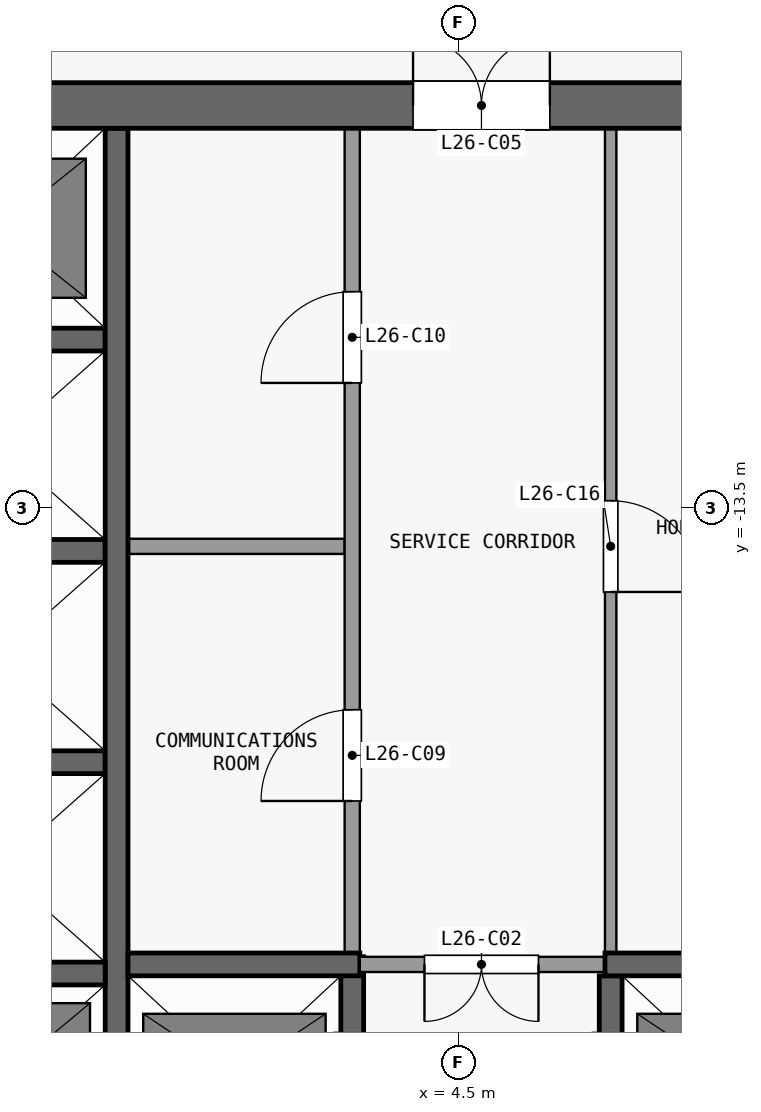
"""IFC4 building model, lengths in metres.
Left out: names, types, materials, properties, quantities, classifications, styles, units other than length and angle.
Written with IfcOpenShell. Run it as: python <this file> out.ifc"""

import sys

from ifc_helpers import new_model, si_unit, direction, frame, frame_2d, origin, place, context, subcontext, project, spatial, rectangle, extrude, element, fill, save


model = new_model("IFC4")
c1 = context("Model", 3, precision=1e-05, world=origin(), true_north=direction((0.0, 1.0)))
c2 = subcontext(c1, "Body", "Model", "MODEL_VIEW")
j1 = project(units=[si_unit("LENGTHUNIT", "METRE"), si_unit("PLANEANGLEUNIT", "RADIAN")], contexts=[c1])
p1 = place(None, origin())
s1 = spatial("IfcSite", under=j1, at=p1, CompositionType="ELEMENT")
p2 = place(p1, origin())
s2 = spatial("IfcBuilding", under=s1, at=p2, CompositionType="ELEMENT")
p3 = place(p2, frame((0.0, 0.0, 106.3)))
s3 = spatial("IfcBuildingStorey", under=s2, at=p3, CompositionType="ELEMENT", Elevation=106.3)
p4 = place(p3, frame((-13.4, -8.2, 0.0), z_axis=(0.0, 0.0, 1.0), x_axis=(1.0, 0.0, 0.0)))
e1 = element("IfcWall", 1, at=p4, inside=s3, PredefinedType="SHEAR", context=c2, shape_type="SweptSolid", body=[
    extrude(rectangle(XDim=26.8, YDim=0.6, at=frame_2d((13.4, 0.0))), origin(), (0.0, 0.0, 1.0), 3.3),
])
p5 = place(p4, frame((7.7, 0.0, 0.0)))
e2 = element("IfcOpeningElement", 2, at=p5, cuts=e1, PredefinedType="OPENING", context=c2, shape_type="SweptSolid", body=[
    extrude(rectangle(XDim=1.8, YDim=2.1, at=frame_2d((0.9, 1.05))), frame((0.0, 0.31, 0.0), z_axis=(0.0, -1.0, 0.0), x_axis=(1.0, 0.0, 0.0)), (0.0, 0.0, 1.0), 0.62),
])
p6 = place(p4, frame((17.3, 0.0, 0.0)))
e3 = element("IfcOpeningElement", 3, at=p6, cuts=e1, PredefinedType="OPENING", context=c2, shape_type="SweptSolid", body=[
    extrude(rectangle(XDim=1.8, YDim=2.1, at=frame_2d((0.9, 1.05))), frame((0.0, 0.31, 0.0), z_axis=(0.0, -1.0, 0.0), x_axis=(1.0, 0.0, 0.0)), (0.0, 0.0, 1.0), 0.62),
])
p7 = place(p4, frame((2.625, 0.0, 0.0)))
e4 = element("IfcOpeningElement", 4, at=p7, cuts=e1, PredefinedType="OPENING", context=c2, shape_type="SweptSolid", body=[
    extrude(rectangle(XDim=0.9, YDim=2.1, at=frame_2d((0.45, 1.05))), frame((0.0, 0.31, 0.0), z_axis=(0.0, -1.0, 0.0), x_axis=(1.0, 0.0, 0.0)), (0.0, 0.0, 1.0), 0.62),
])
p8 = place(p4, frame((23.275, 0.0, 0.0)))
e5 = element("IfcOpeningElement", 5, at=p8, cuts=e1, PredefinedType="OPENING", context=c2, shape_type="SweptSolid", body=[
    extrude(rectangle(XDim=0.9, YDim=2.1, at=frame_2d((0.45, 1.05))), frame((0.0, 0.31, 0.0), z_axis=(0.0, -1.0, 0.0), x_axis=(1.0, 0.0, 0.0)), (0.0, 0.0, 1.0), 0.62),
])
p9 = place(p3, frame((-2.95, -19.62, 0.0), z_axis=(0.0, 0.0, 1.0), x_axis=(1.0, 0.0, 0.0)))
e6 = element("IfcWall", 6, at=p9, inside=s3, PredefinedType="SHEAR", context=c2, shape_type="SweptSolid", body=[
    extrude(rectangle(XDim=2.8, YDim=0.3, at=frame_2d((1.4, 0.0))), origin(), (0.0, 0.0, 1.0), 3.3),
])
p10 = place(p3, frame((0.15, -19.5, 0.0), z_axis=(0.0, 0.0, 1.0), x_axis=(1.0, 0.0, 0.0)))
e7 = element("IfcWall", 7, at=p10, inside=s3, PredefinedType="SHEAR", context=c2, shape_type="SweptSolid", body=[
    extrude(rectangle(XDim=3.05, YDim=0.3, at=frame_2d((1.525, 0.0))), origin(), (0.0, 0.0, 1.0), 3.3),
])
p11 = place(p3, frame((6.575, -19.5, 0.0), z_axis=(0.0, 0.0, 1.0), x_axis=(-1.0, 0.0, 0.0)))
e8 = element("IfcWall", 8, at=p11, inside=s3, PredefinedType="PARTITIONING", context=c2, shape_type="SweptSolid", body=[
    extrude(rectangle(XDim=3.375, YDim=0.2, at=frame_2d((1.688, 0.0))), origin(), (0.0, 0.0, 1.0), 3.3),
])
p12 = place(p11, frame((1.025, 0.0, 0.0)))
e9 = element("IfcOpeningElement", 9, at=p12, cuts=e8, PredefinedType="OPENING", context=c2, shape_type="SweptSolid", body=[
    extrude(rectangle(XDim=1.5, YDim=2.1, at=frame_2d((0.75, 1.05))), frame((0.0, 0.11, 0.0), z_axis=(0.0, -1.0, 0.0), x_axis=(1.0, 0.0, 0.0)), (0.0, 0.0, 1.0), 0.22),
])
p13 = place(p3, frame((6.425, -19.5, 0.0), z_axis=(0.0, 0.0, 1.0), x_axis=(1.0, 0.0, 0.0)))
e10 = element("IfcWall", 10, at=p13, inside=s3, PredefinedType="SHEAR", context=c2, shape_type="SweptSolid", body=[
    extrude(rectangle(XDim=3.025, YDim=0.3, at=frame_2d((1.512, 0.0))), origin(), (0.0, 0.0, 1.0), 3.3),
])
for number, where, z_axis, x_axis in (
    (11, (-2.95, -16.84, 0.0), (0.0, 0.0, 1.0), (1.0, 0.0, 0.0)),
    (12, (-2.95, -14.06, 0.0), (0.0, 0.0, 1.0), (1.0, 0.0, 0.0)),
):
    element("IfcWall", number, at=place(p3, frame(where, z_axis=z_axis, x_axis=x_axis)), inside=s3, PredefinedType="SHEAR", context=c2, shape_type="SweptSolid", body=[
        extrude(rectangle(XDim=2.8, YDim=0.3, at=frame_2d((1.4, 0.0))), origin(), (0.0, 0.0, 1.0), 3.3),
    ])
p14 = place(p3, frame((0.15, -14.0, 0.0), z_axis=(0.0, 0.0, 1.0), x_axis=(1.0, 0.0, 0.0)))
e13 = element("IfcWall", 13, at=p14, inside=s3, PredefinedType="PARTITIONING", context=c2, shape_type="SweptSolid", body=[
    extrude(rectangle(XDim=2.85, YDim=0.2, at=frame_2d((1.425, 0.0))), origin(), (0.0, 0.0, 1.0), 3.3),
])
p15 = place(p3, frame((-2.95, -11.28, 0.0), z_axis=(0.0, 0.0, 1.0), x_axis=(1.0, 0.0, 0.0)))
e14 = element("IfcWall", 14, at=p15, inside=s3, PredefinedType="SHEAR", context=c2, shape_type="SweptSolid", body=[
    extrude(rectangle(XDim=2.8, YDim=0.3, at=frame_2d((1.4, 0.0))), origin(), (0.0, 0.0, 1.0), 3.3),
])
p16 = place(p3, frame((0.0, -22.25, 0.0), z_axis=(0.0, 0.0, 1.0), x_axis=(0.0, 1.0, 0.0)))
e15 = element("IfcWall", 15, at=p16, inside=s3, PredefinedType="SHEAR", context=c2, shape_type="SweptSolid", body=[
    extrude(rectangle(XDim=13.75, YDim=0.3, at=frame_2d((6.875, 0.0))), origin(), (0.0, 0.0, 1.0), 3.3),
])
p17 = place(p3, frame((3.1, -22.25, 0.0), z_axis=(0.0, 0.0, 1.0), x_axis=(0.0, 1.0, 0.0)))
e16 = element("IfcWall", 16, at=p17, inside=s3, PredefinedType="SHEAR", context=c2, shape_type="SweptSolid", body=[
    extrude(rectangle(XDim=2.85, YDim=0.3, at=frame_2d((1.425, 0.0))), origin(), (0.0, 0.0, 1.0), 3.3),
])
p18 = place(p17, frame((0.75, 0.0, 0.0)))
e17 = element("IfcOpeningElement", 17, at=p18, cuts=e16, PredefinedType="OPENING", context=c2, shape_type="SweptSolid", body=[
    extrude(rectangle(XDim=1.1, YDim=2.1, at=frame_2d((0.55, 1.05))), frame((0.0, 0.16, 0.0), z_axis=(0.0, -1.0, 0.0), x_axis=(1.0, 0.0, 0.0)), (0.0, 0.0, 1.0), 0.32),
])
p19 = place(p3, frame((3.1, -19.6, 0.0), z_axis=(0.0, 0.0, 1.0), x_axis=(0.0, 1.0, 0.0)))
e18 = element("IfcWall", 18, at=p19, inside=s3, PredefinedType="PARTITIONING", context=c2, shape_type="SweptSolid", body=[
    extrude(rectangle(XDim=11.1, YDim=0.2, at=frame_2d((5.55, 0.0))), origin(), (0.0, 0.0, 1.0), 3.3),
])
p20 = place(p19, frame((2.25, 0.0, 0.0)))
e19 = element("IfcOpeningElement", 19, at=p20, cuts=e18, PredefinedType="OPENING", context=c2, shape_type="SweptSolid", body=[
    extrude(rectangle(XDim=1.2, YDim=2.1, at=frame_2d((0.6, 1.05))), frame((0.0, 0.11, 0.0), z_axis=(0.0, -1.0, 0.0), x_axis=(1.0, 0.0, 0.0)), (0.0, 0.0, 1.0), 0.22),
])
p21 = place(p19, frame((7.75, 0.0, 0.0)))
e20 = element("IfcOpeningElement", 20, at=p21, cuts=e18, PredefinedType="OPENING", context=c2, shape_type="SweptSolid", body=[
    extrude(rectangle(XDim=1.2, YDim=2.1, at=frame_2d((0.6, 1.05))), frame((0.0, 0.11, 0.0), z_axis=(0.0, -1.0, 0.0), x_axis=(1.0, 0.0, 0.0)), (0.0, 0.0, 1.0), 0.22),
])
p22 = place(p3, frame((6.5, -22.25, 0.0), z_axis=(0.0, 0.0, 1.0), x_axis=(0.0, 1.0, 0.0)))
e21 = element("IfcWall", 21, at=p22, inside=s3, PredefinedType="SHEAR", context=c2, shape_type="SweptSolid", body=[
    extrude(rectangle(XDim=2.6, YDim=0.3, at=frame_2d((1.3, 0.0))), origin(), (0.0, 0.0, 1.0), 3.3),
])
p23 = place(p22, frame((0.75, 0.0, 0.0)))
e22 = element("IfcOpeningElement", 22, at=p23, cuts=e21, PredefinedType="OPENING", context=c2, shape_type="SweptSolid", body=[
    extrude(rectangle(XDim=1.1, YDim=2.1, at=frame_2d((0.55, 1.05))), frame((0.0, 0.16, 0.0), z_axis=(0.0, -1.0, 0.0), x_axis=(1.0, 0.0, 0.0)), (0.0, 0.0, 1.0), 0.32),
])
p24 = place(p3, frame((6.5, -8.5, 0.0), z_axis=(0.0, 0.0, 1.0), x_axis=(0.0, -1.0, 0.0)))
e23 = element("IfcWall", 23, at=p24, inside=s3, PredefinedType="PARTITIONING", context=c2, shape_type="SweptSolid", body=[
    extrude(rectangle(XDim=10.85, YDim=0.15, at=frame_2d((5.425, 0.0))), origin(), (0.0, 0.0, 1.0), 3.3),
])
p25 = place(p24, frame((4.9, 0.0, 0.0)))
e24 = element("IfcOpeningElement", 24, at=p25, cuts=e23, PredefinedType="OPENING", context=c2, shape_type="SweptSolid", body=[
    extrude(rectangle(XDim=1.2, YDim=2.1, at=frame_2d((0.6, 1.05))), frame((0.0, 0.085, 0.0), z_axis=(0.0, -1.0, 0.0), x_axis=(1.0, 0.0, 0.0)), (0.0, 0.0, 1.0), 0.17),
])
p26 = place(p12, origin())
e25 = element("IfcDoor", 25, at=p26, inside=s3, OperationType="DOUBLE_DOOR_SINGLE_SWING", PredefinedType="DOOR", context=c2, shape_type="SweptSolid", body=[
    extrude(rectangle(XDim=1.5, YDim=2.1, at=frame_2d((0.75, 1.05))), frame((0.0, 0.025, 0.0), z_axis=(0.0, -1.0, 0.0), x_axis=(1.0, 0.0, 0.0)), (0.0, 0.0, 1.0), 0.05),
])
fill(e9, e25)
p27 = place(p6, origin())
e26 = element("IfcDoor", 26, at=p27, inside=s3, OperationType="DOUBLE_DOOR_SINGLE_SWING", PredefinedType="DOOR", context=c2, shape_type="SweptSolid", body=[
    extrude(rectangle(XDim=1.8, YDim=2.1, at=frame_2d((0.9, 1.05))), frame((0.0, 0.025, 0.0), z_axis=(0.0, -1.0, 0.0), x_axis=(1.0, 0.0, 0.0)), (0.0, 0.0, 1.0), 0.05),
])
fill(e3, e26)
p28 = place(p20, origin())
e27 = element("IfcDoor", 27, at=p28, inside=s3, OperationType="SINGLE_SWING_LEFT", PredefinedType="DOOR", context=c2, shape_type="SweptSolid", body=[
    extrude(rectangle(XDim=1.2, YDim=2.1, at=frame_2d((0.6, 1.05))), frame((0.0, 0.025, 0.0), z_axis=(0.0, -1.0, 0.0), x_axis=(1.0, 0.0, 0.0)), (0.0, 0.0, 1.0), 0.05),
])
fill(e19, e27)
p29 = place(p21, origin())
e28 = element("IfcDoor", 28, at=p29, inside=s3, OperationType="SINGLE_SWING_LEFT", PredefinedType="DOOR", context=c2, shape_type="SweptSolid", body=[
    extrude(rectangle(XDim=1.2, YDim=2.1, at=frame_2d((0.6, 1.05))), frame((0.0, 0.025, 0.0), z_axis=(0.0, -1.0, 0.0), x_axis=(1.0, 0.0, 0.0)), (0.0, 0.0, 1.0), 0.05),
])
fill(e20, e28)
p30 = place(p25, origin())
e29 = element("IfcDoor", 29, at=p30, inside=s3, OperationType="SINGLE_SWING_RIGHT", PredefinedType="DOOR", context=c2, shape_type="SweptSolid", body=[
    extrude(rectangle(XDim=1.2, YDim=2.1, at=frame_2d((0.6, 1.05))), frame((0.0, 0.025, 0.0), z_axis=(0.0, -1.0, 0.0), x_axis=(1.0, 0.0, 0.0)), (0.0, 0.0, 1.0), 0.05),
])
fill(e24, e29)
save(model, sys.argv[1])
